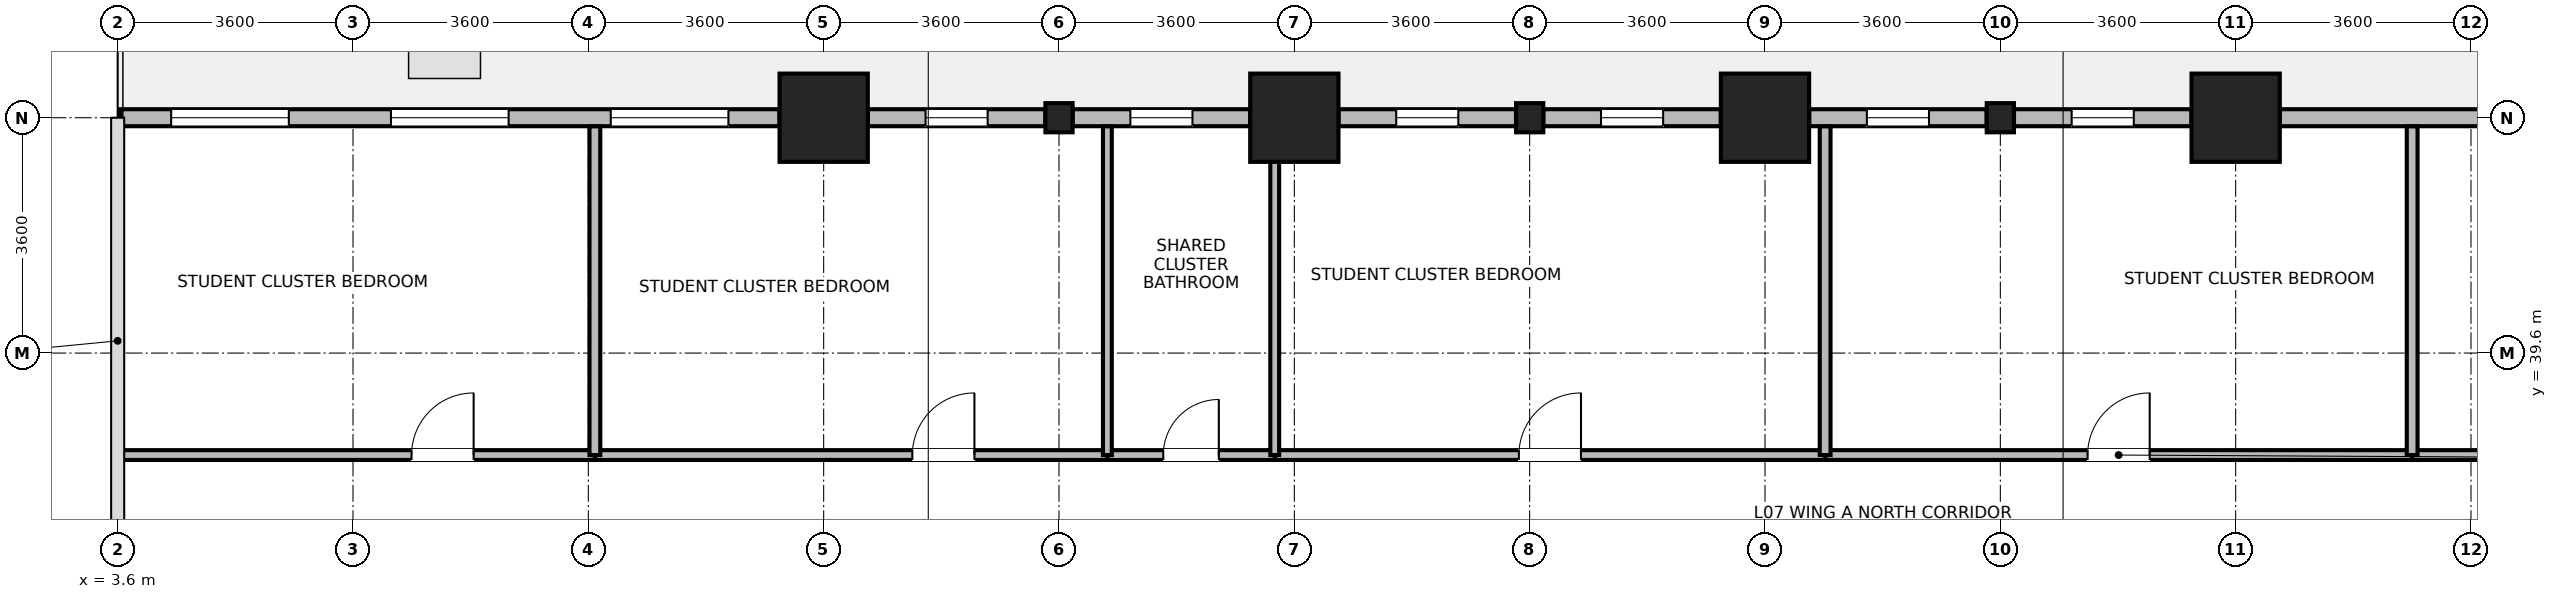
"""IFC4 building model, lengths in metres.
Left out: names, types, materials, properties, quantities, classifications, styles, units other than length and angle.
Written with IfcOpenShell. Run it as: python <this file> out.ifc"""

import sys

from ifc_helpers import new_model, si_unit, direction, frame, frame_2d, origin, origin_2d, place, context, subcontext, project, spatial, rectangle, i_section, extrude, source, transform, mapped, element, fill, save


model = new_model("IFC4")
c1 = context("Model", 3, precision=1e-05, world=origin(), true_north=direction((0.0, 1.0)))
c2 = subcontext(c1, "Body", "Model", "MODEL_VIEW")
j1 = project(units=[si_unit("LENGTHUNIT", "METRE"), si_unit("PLANEANGLEUNIT", "RADIAN")], contexts=[c1])
p1 = place(None, origin())
s1 = spatial("IfcSite", under=j1, at=p1, CompositionType="ELEMENT")
p2 = place(p1, origin())
s2 = spatial("IfcBuilding", under=s1, at=p2, CompositionType="ELEMENT")
p3 = place(p2, frame((0.0, 0.0, 32.7)))
s3 = spatial("IfcBuildingStorey", under=s2, at=p3, CompositionType="ELEMENT", Elevation=32.7)
m1 = source(origin(), c2, "Body", "SweptSolid", [
    extrude(rectangle(XDim=1.35, YDim=1.35, at=origin_2d()), origin(), (0.0, 0.0, 1.0), 3.7),
])
for number, where, z_axis, x_axis in (
    (1, (14.4, 43.2, 0.0), (0.0, 0.0, 1.0), (1.0, 0.0, 0.0)),
    (2, (21.6, 43.2, 0.0), (0.0, 0.0, 1.0), (1.0, 0.0, 0.0)),
    (3, (28.8, 43.2, 0.0), (0.0, 0.0, 1.0), (1.0, 0.0, 0.0)),
    (4, (36.0, 43.2, 0.0), (0.0, 0.0, 1.0), (1.0, 0.0, 0.0)),
):
    element("IfcColumn", number, at=place(p3, frame(where, z_axis=z_axis, x_axis=x_axis)), inside=s3, PredefinedType="COLUMN", context=c2, shape_type="MappedRepresentation", body=[
        mapped(m1, transform((0.0, 0.0, 0.0), x_axis=(1.0, 0.0, 0.0), y_axis=(0.0, 1.0, 0.0), z_axis=(0.0, 0.0, 1.0), scale=1.0)),
    ])
m2 = source(origin(), c2, "Body", "SweptSolid", [
    extrude(i_section(OverallWidth=0.416, OverallDepth=0.446, WebThickness=0.029, FlangeThickness=0.04, FilletRadius=0.015, at=origin_2d()), origin(), (0.0, 0.0, 1.0), 3.7),
])
for number, where, z_axis, x_axis in (
    (5, (18.0, 43.2, 0.0), (0.0, 0.0, 1.0), (1.0, 0.0, 0.0)),
    (6, (25.2, 43.2, 0.0), (0.0, 0.0, 1.0), (1.0, 0.0, 0.0)),
    (7, (32.4, 43.2, 0.0), (0.0, 0.0, 1.0), (1.0, 0.0, 0.0)),
):
    element("IfcColumn", number, at=place(p3, frame(where, z_axis=z_axis, x_axis=x_axis)), inside=s3, PredefinedType="COLUMN", context=c2, shape_type="MappedRepresentation", body=[
        mapped(m2, transform((0.0, 0.0, 0.0), x_axis=(1.0, 0.0, 0.0), y_axis=(0.0, 1.0, 0.0), z_axis=(0.0, 0.0, 1.0), scale=1.0)),
    ])
p4 = place(p3, frame((36.676, 43.2, 0.0), z_axis=(0.0, 0.0, 1.0), x_axis=(1.0, 0.0, 0.0)))
e8 = element("IfcWall", 8, at=p4, inside=s3, PredefinedType="STANDARD", context=c2, shape_type="SweptSolid", body=[
    extrude(rectangle(XDim=9.448, YDim=0.26, at=frame_2d((4.724, 0.0))), origin(), (0.0, 0.0, 1.0), 2.93),
])
p5 = place(p4, frame((3.824, 0.0, 0.85)))
e9 = element("IfcOpeningElement", 9, at=p5, cuts=e8, PredefinedType="OPENING", context=c2, shape_type="SweptSolid", body=[
    extrude(rectangle(XDim=1.8, YDim=1.85, at=frame_2d((0.9, 0.925))), frame((0.0, 0.14, 0.0), z_axis=(0.0, -1.0, 0.0), x_axis=(1.0, 0.0, 0.0)), (0.0, 0.0, 1.0), 0.28),
])
p6 = place(p4, frame((6.973, 0.0, 0.85)))
e10 = element("IfcOpeningElement", 10, at=p6, cuts=e8, PredefinedType="OPENING", context=c2, shape_type="SweptSolid", body=[
    extrude(rectangle(XDim=1.8, YDim=1.85, at=frame_2d((0.9, 0.925))), frame((0.0, 0.14, 0.0), z_axis=(0.0, -1.0, 0.0), x_axis=(1.0, 0.0, 0.0)), (0.0, 0.0, 1.0), 0.28),
])
p7 = place(p3, frame((32.609, 43.2, 0.0), z_axis=(0.0, 0.0, 1.0), x_axis=(1.0, 0.0, 0.0)))
e11 = element("IfcWall", 11, at=p7, inside=s3, PredefinedType="STANDARD", context=c2, shape_type="SweptSolid", body=[
    extrude(rectangle(XDim=2.715, YDim=0.26, at=frame_2d((1.357, 0.0))), origin(), (0.0, 0.0, 1.0), 2.93),
])
p8 = place(p7, frame((0.883, 0.0, 0.85)))
e12 = element("IfcOpeningElement", 12, at=p8, cuts=e11, PredefinedType="OPENING", context=c2, shape_type="SweptSolid", body=[
    extrude(rectangle(XDim=0.95, YDim=1.75, at=frame_2d((0.475, 0.875))), frame((0.0, 0.14, 0.0), z_axis=(0.0, -1.0, 0.0), x_axis=(1.0, 0.0, 0.0)), (0.0, 0.0, 1.0), 0.28),
])
p9 = place(p3, frame((29.476, 43.2, 0.0), z_axis=(0.0, 0.0, 1.0), x_axis=(1.0, 0.0, 0.0)))
e13 = element("IfcWall", 13, at=p9, inside=s3, PredefinedType="STANDARD", context=c2, shape_type="SweptSolid", body=[
    extrude(rectangle(XDim=2.715, YDim=0.26, at=frame_2d((1.357, 0.0))), origin(), (0.0, 0.0, 1.0), 2.93),
])
p10 = place(p9, frame((0.883, 0.0, 0.85)))
e14 = element("IfcOpeningElement", 14, at=p10, cuts=e13, PredefinedType="OPENING", context=c2, shape_type="SweptSolid", body=[
    extrude(rectangle(XDim=0.95, YDim=1.75, at=frame_2d((0.475, 0.875))), frame((0.0, 0.14, 0.0), z_axis=(0.0, -1.0, 0.0), x_axis=(1.0, 0.0, 0.0)), (0.0, 0.0, 1.0), 0.28),
])
p11 = place(p3, frame((25.409, 43.2, 0.0), z_axis=(0.0, 0.0, 1.0), x_axis=(1.0, 0.0, 0.0)))
e15 = element("IfcWall", 15, at=p11, inside=s3, PredefinedType="STANDARD", context=c2, shape_type="SweptSolid", body=[
    extrude(rectangle(XDim=2.715, YDim=0.26, at=frame_2d((1.357, 0.0))), origin(), (0.0, 0.0, 1.0), 2.93),
])
p12 = place(p11, frame((0.883, 0.0, 0.85)))
e16 = element("IfcOpeningElement", 16, at=p12, cuts=e15, PredefinedType="OPENING", context=c2, shape_type="SweptSolid", body=[
    extrude(rectangle(XDim=0.95, YDim=1.75, at=frame_2d((0.475, 0.875))), frame((0.0, 0.14, 0.0), z_axis=(0.0, -1.0, 0.0), x_axis=(1.0, 0.0, 0.0)), (0.0, 0.0, 1.0), 0.28),
])
p13 = place(p3, frame((22.276, 43.2, 0.0), z_axis=(0.0, 0.0, 1.0), x_axis=(1.0, 0.0, 0.0)))
e17 = element("IfcWall", 17, at=p13, inside=s3, PredefinedType="STANDARD", context=c2, shape_type="SweptSolid", body=[
    extrude(rectangle(XDim=2.715, YDim=0.26, at=frame_2d((1.357, 0.0))), origin(), (0.0, 0.0, 1.0), 2.93),
])
p14 = place(p13, frame((0.883, 0.0, 0.85)))
e18 = element("IfcOpeningElement", 18, at=p14, cuts=e17, PredefinedType="OPENING", context=c2, shape_type="SweptSolid", body=[
    extrude(rectangle(XDim=0.95, YDim=1.75, at=frame_2d((0.475, 0.875))), frame((0.0, 0.14, 0.0), z_axis=(0.0, -1.0, 0.0), x_axis=(1.0, 0.0, 0.0)), (0.0, 0.0, 1.0), 0.28),
])
p15 = place(p3, frame((18.209, 43.2, 0.0), z_axis=(0.0, 0.0, 1.0), x_axis=(1.0, 0.0, 0.0)))
e19 = element("IfcWall", 19, at=p15, inside=s3, PredefinedType="STANDARD", context=c2, shape_type="SweptSolid", body=[
    extrude(rectangle(XDim=2.715, YDim=0.26, at=frame_2d((1.357, 0.0))), origin(), (0.0, 0.0, 1.0), 2.93),
])
p16 = place(p15, frame((0.883, 0.0, 0.85)))
e20 = element("IfcOpeningElement", 20, at=p16, cuts=e19, PredefinedType="OPENING", context=c2, shape_type="SweptSolid", body=[
    extrude(rectangle(XDim=0.95, YDim=1.75, at=frame_2d((0.475, 0.875))), frame((0.0, 0.14, 0.0), z_axis=(0.0, -1.0, 0.0), x_axis=(1.0, 0.0, 0.0)), (0.0, 0.0, 1.0), 0.28),
])
p17 = place(p3, frame((15.076, 43.2, 0.0), z_axis=(0.0, 0.0, 1.0), x_axis=(1.0, 0.0, 0.0)))
e21 = element("IfcWall", 21, at=p17, inside=s3, PredefinedType="STANDARD", context=c2, shape_type="SweptSolid", body=[
    extrude(rectangle(XDim=2.715, YDim=0.26, at=frame_2d((1.357, 0.0))), origin(), (0.0, 0.0, 1.0), 2.93),
])
p18 = place(p17, frame((0.883, 0.0, 0.85)))
e22 = element("IfcOpeningElement", 22, at=p18, cuts=e21, PredefinedType="OPENING", context=c2, shape_type="SweptSolid", body=[
    extrude(rectangle(XDim=0.95, YDim=1.75, at=frame_2d((0.475, 0.875))), frame((0.0, 0.14, 0.0), z_axis=(0.0, -1.0, 0.0), x_axis=(1.0, 0.0, 0.0)), (0.0, 0.0, 1.0), 0.28),
])
p19 = place(p3, frame((3.637, 43.2, 0.0), z_axis=(0.0, 0.0, 1.0), x_axis=(1.0, 0.0, 0.0)))
e23 = element("IfcWall", 23, at=p19, inside=s3, PredefinedType="STANDARD", context=c2, shape_type="SweptSolid", body=[
    extrude(rectangle(XDim=10.087, YDim=0.26, at=frame_2d((5.043, 0.0))), origin(), (0.0, 0.0, 1.0), 3.43),
])
p20 = place(p19, frame((0.781, 0.0, 0.85)))
e24 = element("IfcOpeningElement", 24, at=p20, cuts=e23, PredefinedType="OPENING", context=c2, shape_type="SweptSolid", body=[
    extrude(rectangle(XDim=1.8, YDim=1.85, at=frame_2d((0.9, 0.925))), frame((0.0, 0.14, 0.0), z_axis=(0.0, -1.0, 0.0), x_axis=(1.0, 0.0, 0.0)), (0.0, 0.0, 1.0), 0.28),
])
p21 = place(p19, frame((4.144, 0.0, 0.85)))
e25 = element("IfcOpeningElement", 25, at=p21, cuts=e23, PredefinedType="OPENING", context=c2, shape_type="SweptSolid", body=[
    extrude(rectangle(XDim=1.8, YDim=1.85, at=frame_2d((0.9, 0.925))), frame((0.0, 0.14, 0.0), z_axis=(0.0, -1.0, 0.0), x_axis=(1.0, 0.0, 0.0)), (0.0, 0.0, 1.0), 0.28),
])
p22 = place(p19, frame((7.506, 0.0, 0.85)))
e26 = element("IfcOpeningElement", 26, at=p22, cuts=e23, PredefinedType="OPENING", context=c2, shape_type="SweptSolid", body=[
    extrude(rectangle(XDim=1.8, YDim=1.85, at=frame_2d((0.9, 0.925))), frame((0.0, 0.14, 0.0), z_axis=(0.0, -1.0, 0.0), x_axis=(1.0, 0.0, 0.0)), (0.0, 0.0, 1.0), 0.28),
])
p23 = place(p3, frame((38.7, 38.04, 0.0), z_axis=(0.0, 0.0, 1.0), x_axis=(1.0, 0.0, 0.0)))
e27 = element("IfcWall", 27, at=p23, inside=s3, PredefinedType="PARTITIONING", context=c2, shape_type="SweptSolid", body=[
    extrude(rectangle(XDim=17.06, YDim=0.15, at=frame_2d((8.53, 0.0))), origin(), (0.0, 0.0, 1.0), 3.43),
])
p24 = place(p23, frame((6.374, 0.0, 0.0)))
e28 = element("IfcOpeningElement", 28, at=p24, cuts=e27, PredefinedType="OPENING", context=c2, shape_type="SweptSolid", body=[
    extrude(rectangle(XDim=0.9, YDim=2.08, at=frame_2d((0.45, 1.04))), frame((0.0, 0.085, 0.0), z_axis=(0.0, -1.0, 0.0), x_axis=(1.0, 0.0, 0.0)), (0.0, 0.0, 1.0), 0.17),
])
p25 = place(p3, frame((29.72, 38.04, 0.0), z_axis=(0.0, 0.0, 1.0), x_axis=(1.0, 0.0, 0.0)))
e29 = element("IfcWall", 29, at=p25, inside=s3, PredefinedType="PARTITIONING", context=c2, shape_type="SweptSolid", body=[
    extrude(rectangle(XDim=8.98, YDim=0.15, at=frame_2d((4.49, 0.0))), origin(), (0.0, 0.0, 1.0), 3.43),
])
p26 = place(p25, frame((4.015, 0.0, 0.0)))
e30 = element("IfcOpeningElement", 30, at=p26, cuts=e29, PredefinedType="OPENING", context=c2, shape_type="SweptSolid", body=[
    extrude(rectangle(XDim=0.95, YDim=2.1, at=frame_2d((0.475, 1.05))), frame((0.0, 0.085, 0.0), z_axis=(0.0, -1.0, 0.0), x_axis=(1.0, 0.0, 0.0)), (0.0, 0.0, 1.0), 0.17),
])
p27 = place(p3, frame((21.3, 38.04, 0.0), z_axis=(0.0, 0.0, 1.0), x_axis=(1.0, 0.0, 0.0)))
e31 = element("IfcWall", 31, at=p27, inside=s3, PredefinedType="PARTITIONING", context=c2, shape_type="SweptSolid", body=[
    extrude(rectangle(XDim=8.42, YDim=0.15, at=frame_2d((4.21, 0.0))), origin(), (0.0, 0.0, 1.0), 3.43),
])
p28 = place(p27, frame((3.735, 0.0, 0.0)))
e32 = element("IfcOpeningElement", 32, at=p28, cuts=e31, PredefinedType="OPENING", context=c2, shape_type="SweptSolid", body=[
    extrude(rectangle(XDim=0.95, YDim=2.1, at=frame_2d((0.475, 1.05))), frame((0.0, 0.085, 0.0), z_axis=(0.0, -1.0, 0.0), x_axis=(1.0, 0.0, 0.0)), (0.0, 0.0, 1.0), 0.17),
])
p29 = place(p3, frame((10.9, 38.04, 0.0), z_axis=(0.0, 0.0, 1.0), x_axis=(1.0, 0.0, 0.0)))
e33 = element("IfcWall", 33, at=p29, inside=s3, PredefinedType="PARTITIONING", context=c2, shape_type="SweptSolid", body=[
    extrude(rectangle(XDim=7.84, YDim=0.15, at=frame_2d((3.92, 0.0))), origin(), (0.0, 0.0, 1.0), 3.43),
])
p30 = place(p29, frame((4.856, 0.0, 0.0)))
e34 = element("IfcOpeningElement", 34, at=p30, cuts=e33, PredefinedType="OPENING", context=c2, shape_type="SweptSolid", body=[
    extrude(rectangle(XDim=0.95, YDim=2.1, at=frame_2d((0.475, 1.05))), frame((0.0, 0.085, 0.0), z_axis=(0.0, -1.0, 0.0), x_axis=(1.0, 0.0, 0.0)), (0.0, 0.0, 1.0), 0.17),
])
p31 = place(p3, frame((3.62, 38.04, 0.0), z_axis=(0.0, 0.0, 1.0), x_axis=(1.0, 0.0, 0.0)))
e35 = element("IfcWall", 35, at=p31, inside=s3, PredefinedType="PARTITIONING", context=c2, shape_type="SweptSolid", body=[
    extrude(rectangle(XDim=7.28, YDim=0.15, at=frame_2d((3.64, 0.0))), origin(), (0.0, 0.0, 1.0), 3.43),
])
p32 = place(p31, frame((4.475, 0.0, 0.0)))
e36 = element("IfcOpeningElement", 36, at=p32, cuts=e35, PredefinedType="OPENING", context=c2, shape_type="SweptSolid", body=[
    extrude(rectangle(XDim=0.95, YDim=2.1, at=frame_2d((0.475, 1.05))), frame((0.0, 0.085, 0.0), z_axis=(0.0, -1.0, 0.0), x_axis=(1.0, 0.0, 0.0)), (0.0, 0.0, 1.0), 0.17),
])
p33 = place(p3, frame((18.74, 38.04, 0.0), z_axis=(0.0, 0.0, 1.0), x_axis=(1.0, 0.0, 0.0)))
e37 = element("IfcWall", 37, at=p33, inside=s3, PredefinedType="PARTITIONING", context=c2, shape_type="SweptSolid", body=[
    extrude(rectangle(XDim=2.56, YDim=0.15, at=frame_2d((1.28, 0.0))), origin(), (0.0, 0.0, 1.0), 3.43),
])
p34 = place(p33, frame((0.855, 0.0, 0.0)))
e38 = element("IfcOpeningElement", 38, at=p34, cuts=e37, PredefinedType="OPENING", context=c2, shape_type="SweptSolid", body=[
    extrude(rectangle(XDim=0.85, YDim=2.04, at=frame_2d((0.425, 1.02))), frame((0.0, 0.085, 0.0), z_axis=(0.0, -1.0, 0.0), x_axis=(1.0, 0.0, 0.0)), (0.0, 0.0, 1.0), 0.17),
])
p35 = place(p3, frame((10.9, 38.04, 0.0), z_axis=(0.0, 0.0, 1.0), x_axis=(0.0, 1.0, 0.0)))
e39 = element("IfcWall", 39, at=p35, inside=s3, PredefinedType="PARTITIONING", context=c2, shape_type="SweptSolid", body=[
    extrude(rectangle(XDim=5.028, YDim=0.165, at=frame_2d((2.514, 0.0))), origin(), (0.0, 0.0, 1.0), 3.43),
])
for number, where, z_axis, x_axis in (
    (40, (18.74, 38.04, 0.0), (0.0, 0.0, 1.0), (0.0, 1.0, 0.0)),
    (41, (21.3, 38.04, 0.0), (0.0, 0.0, 1.0), (0.0, 1.0, 0.0)),
):
    element("IfcWall", number, at=place(p3, frame(where, z_axis=z_axis, x_axis=x_axis)), inside=s3, PredefinedType="PARTITIONING", context=c2, shape_type="SweptSolid", body=[
        extrude(rectangle(XDim=5.028, YDim=0.135, at=frame_2d((2.514, 0.0))), origin(), (0.0, 0.0, 1.0), 3.43),
    ])
for number, where, z_axis, x_axis in (
    (42, (29.72, 38.04, 0.0), (0.0, 0.0, 1.0), (0.0, 1.0, 0.0)),
    (43, (38.7, 38.04, 0.0), (0.0, 0.0, 1.0), (0.0, 1.0, 0.0)),
):
    element("IfcWall", number, at=place(p3, frame(where, z_axis=z_axis, x_axis=x_axis)), inside=s3, PredefinedType="PARTITIONING", context=c2, shape_type="SweptSolid", body=[
        extrude(rectangle(XDim=5.028, YDim=0.165, at=frame_2d((2.514, 0.0))), origin(), (0.0, 0.0, 1.0), 3.43),
    ])
p36 = place(p8, origin())
e44 = element("IfcWindow", 44, at=p36, inside=s3, PartitioningType="SINGLE_PANEL", PredefinedType="WINDOW", context=c2, shape_type="SweptSolid", body=[
    extrude(rectangle(XDim=0.95, YDim=1.75, at=frame_2d((0.475, 0.875))), frame((0.0, 0.03, 0.0), z_axis=(0.0, -1.0, 0.0), x_axis=(1.0, 0.0, 0.0)), (0.0, 0.0, 1.0), 0.06),
])
fill(e12, e44)
p37 = place(p10, origin())
e45 = element("IfcWindow", 45, at=p37, inside=s3, PartitioningType="SINGLE_PANEL", PredefinedType="WINDOW", context=c2, shape_type="SweptSolid", body=[
    extrude(rectangle(XDim=0.95, YDim=1.75, at=frame_2d((0.475, 0.875))), frame((0.0, 0.03, 0.0), z_axis=(0.0, -1.0, 0.0), x_axis=(1.0, 0.0, 0.0)), (0.0, 0.0, 1.0), 0.06),
])
fill(e14, e45)
p38 = place(p12, origin())
e46 = element("IfcWindow", 46, at=p38, inside=s3, PartitioningType="SINGLE_PANEL", PredefinedType="WINDOW", context=c2, shape_type="SweptSolid", body=[
    extrude(rectangle(XDim=0.95, YDim=1.75, at=frame_2d((0.475, 0.875))), frame((0.0, 0.03, 0.0), z_axis=(0.0, -1.0, 0.0), x_axis=(1.0, 0.0, 0.0)), (0.0, 0.0, 1.0), 0.06),
])
fill(e16, e46)
p39 = place(p14, origin())
e47 = element("IfcWindow", 47, at=p39, inside=s3, PartitioningType="SINGLE_PANEL", PredefinedType="WINDOW", context=c2, shape_type="SweptSolid", body=[
    extrude(rectangle(XDim=0.95, YDim=1.75, at=frame_2d((0.475, 0.875))), frame((0.0, 0.03, 0.0), z_axis=(0.0, -1.0, 0.0), x_axis=(1.0, 0.0, 0.0)), (0.0, 0.0, 1.0), 0.06),
])
fill(e18, e47)
p40 = place(p16, origin())
e48 = element("IfcWindow", 48, at=p40, inside=s3, PartitioningType="SINGLE_PANEL", PredefinedType="WINDOW", context=c2, shape_type="SweptSolid", body=[
    extrude(rectangle(XDim=0.95, YDim=1.75, at=frame_2d((0.475, 0.875))), frame((0.0, 0.03, 0.0), z_axis=(0.0, -1.0, 0.0), x_axis=(1.0, 0.0, 0.0)), (0.0, 0.0, 1.0), 0.06),
])
fill(e20, e48)
p41 = place(p18, origin())
e49 = element("IfcWindow", 49, at=p41, inside=s3, PartitioningType="SINGLE_PANEL", PredefinedType="WINDOW", context=c2, shape_type="SweptSolid", body=[
    extrude(rectangle(XDim=0.95, YDim=1.75, at=frame_2d((0.475, 0.875))), frame((0.0, 0.03, 0.0), z_axis=(0.0, -1.0, 0.0), x_axis=(1.0, 0.0, 0.0)), (0.0, 0.0, 1.0), 0.06),
])
fill(e22, e49)
p42 = place(p20, origin())
e50 = element("IfcWindow", 50, at=p42, inside=s3, PartitioningType="SINGLE_PANEL", PredefinedType="WINDOW", context=c2, shape_type="SweptSolid", body=[
    extrude(rectangle(XDim=1.8, YDim=1.85, at=frame_2d((0.9, 0.925))), frame((0.0, 0.03, 0.0), z_axis=(0.0, -1.0, 0.0), x_axis=(1.0, 0.0, 0.0)), (0.0, 0.0, 1.0), 0.06),
])
fill(e24, e50)
p43 = place(p21, origin())
e51 = element("IfcWindow", 51, at=p43, inside=s3, PartitioningType="SINGLE_PANEL", PredefinedType="WINDOW", context=c2, shape_type="SweptSolid", body=[
    extrude(rectangle(XDim=1.8, YDim=1.85, at=frame_2d((0.9, 0.925))), frame((0.0, 0.03, 0.0), z_axis=(0.0, -1.0, 0.0), x_axis=(1.0, 0.0, 0.0)), (0.0, 0.0, 1.0), 0.06),
])
fill(e25, e51)
p44 = place(p22, origin())
e52 = element("IfcWindow", 52, at=p44, inside=s3, PartitioningType="SINGLE_PANEL", PredefinedType="WINDOW", context=c2, shape_type="SweptSolid", body=[
    extrude(rectangle(XDim=1.8, YDim=1.85, at=frame_2d((0.9, 0.925))), frame((0.0, 0.03, 0.0), z_axis=(0.0, -1.0, 0.0), x_axis=(1.0, 0.0, 0.0)), (0.0, 0.0, 1.0), 0.06),
])
fill(e26, e52)
p45 = place(p26, origin())
e53 = element("IfcDoor", 53, at=p45, inside=s3, OperationType="SINGLE_SWING_RIGHT", PredefinedType="DOOR", context=c2, shape_type="SweptSolid", body=[
    extrude(rectangle(XDim=0.95, YDim=2.1, at=frame_2d((0.475, 1.05))), frame((0.0, 0.025, 0.0), z_axis=(0.0, -1.0, 0.0), x_axis=(1.0, 0.0, 0.0)), (0.0, 0.0, 1.0), 0.05),
])
fill(e30, e53)
p46 = place(p28, origin())
e54 = element("IfcDoor", 54, at=p46, inside=s3, OperationType="SINGLE_SWING_RIGHT", PredefinedType="DOOR", context=c2, shape_type="SweptSolid", body=[
    extrude(rectangle(XDim=0.95, YDim=2.1, at=frame_2d((0.475, 1.05))), frame((0.0, 0.025, 0.0), z_axis=(0.0, -1.0, 0.0), x_axis=(1.0, 0.0, 0.0)), (0.0, 0.0, 1.0), 0.05),
])
fill(e32, e54)
p47 = place(p30, origin())
e55 = element("IfcDoor", 55, at=p47, inside=s3, OperationType="SINGLE_SWING_RIGHT", PredefinedType="DOOR", context=c2, shape_type="SweptSolid", body=[
    extrude(rectangle(XDim=0.95, YDim=2.1, at=frame_2d((0.475, 1.05))), frame((0.0, 0.025, 0.0), z_axis=(0.0, -1.0, 0.0), x_axis=(1.0, 0.0, 0.0)), (0.0, 0.0, 1.0), 0.05),
])
fill(e34, e55)
p48 = place(p32, origin())
e56 = element("IfcDoor", 56, at=p48, inside=s3, OperationType="SINGLE_SWING_RIGHT", PredefinedType="DOOR", context=c2, shape_type="SweptSolid", body=[
    extrude(rectangle(XDim=0.95, YDim=2.1, at=frame_2d((0.475, 1.05))), frame((0.0, 0.025, 0.0), z_axis=(0.0, -1.0, 0.0), x_axis=(1.0, 0.0, 0.0)), (0.0, 0.0, 1.0), 0.05),
])
fill(e36, e56)
p49 = place(p34, origin())
e57 = element("IfcDoor", 57, at=p49, inside=s3, OperationType="SINGLE_SWING_RIGHT", PredefinedType="DOOR", context=c2, shape_type="SweptSolid", body=[
    extrude(rectangle(XDim=0.85, YDim=2.04, at=frame_2d((0.425, 1.02))), frame((0.0, 0.025, 0.0), z_axis=(0.0, -1.0, 0.0), x_axis=(1.0, 0.0, 0.0)), (0.0, 0.0, 1.0), 0.05),
])
fill(e38, e57)
save(model, sys.argv[1])
